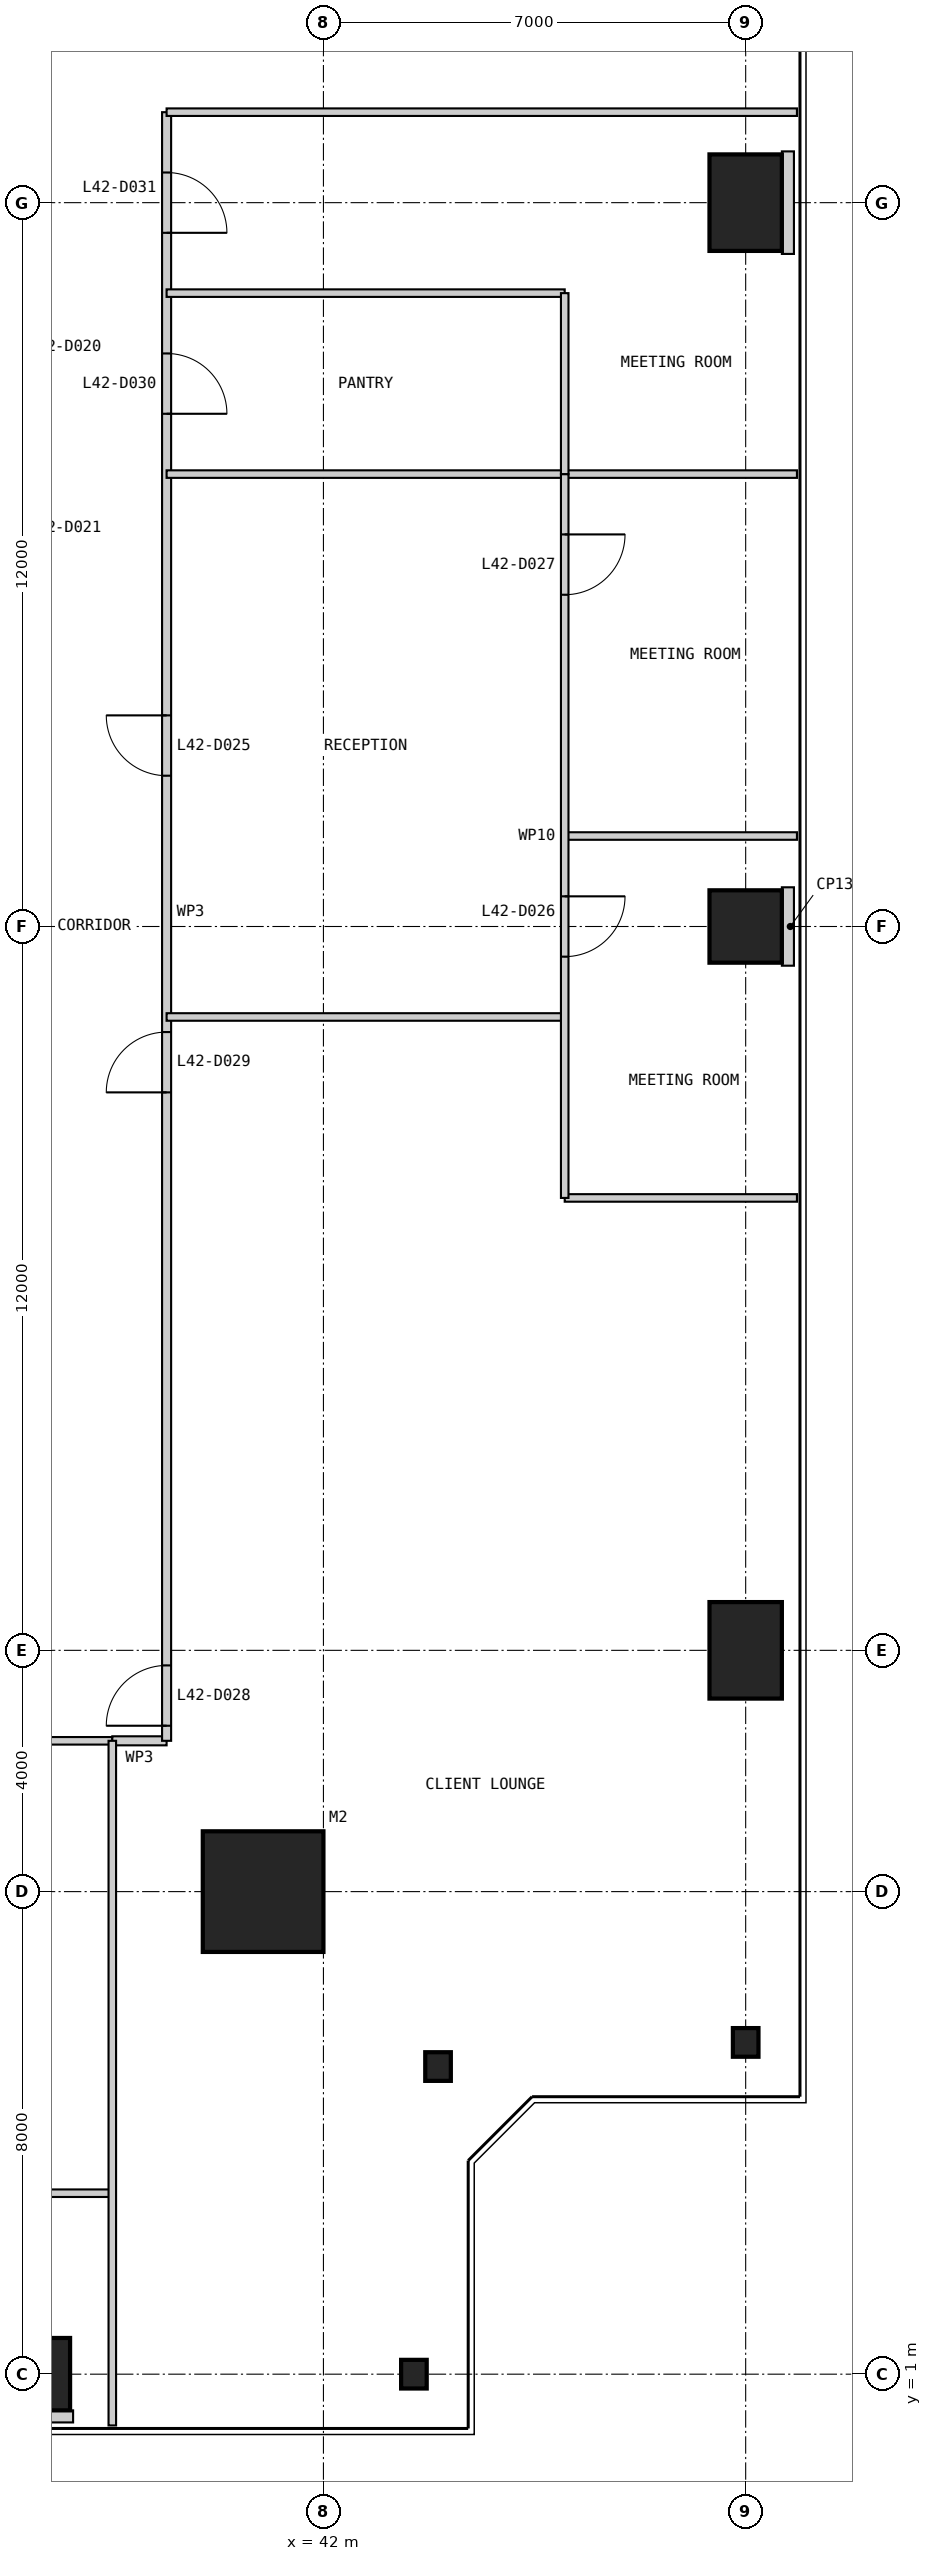
"""IFC4 building model, lengths in metres.
Left out: names, types, materials, properties, quantities, classifications, styles, units other than length and angle.
Written with IfcOpenShell. Run it as: python <this file> out.ifc"""

import sys

from ifc_helpers import new_model, si_unit, direction, frame, frame_2d, origin, origin_2d, place, context, subcontext, project, spatial, rectangle, i_section, extrude, element, fill, save


model = new_model("IFC4")
c1 = context("Model", 3, precision=1e-05, world=origin(), true_north=direction((0.0, 1.0)))
c2 = subcontext(c1, "Body", "Model", "MODEL_VIEW")
j1 = project(units=[si_unit("LENGTHUNIT", "METRE"), si_unit("PLANEANGLEUNIT", "RADIAN")], contexts=[c1])
p1 = place(None, origin())
s1 = spatial("IfcSite", under=j1, at=p1, CompositionType="ELEMENT")
p2 = place(p1, origin())
s2 = spatial("IfcBuilding", under=s1, at=p2, CompositionType="ELEMENT")
p3 = place(p2, frame((0.0, 0.0, 181.8)))
s3 = spatial("IfcBuildingStorey", under=s2, at=p3, CompositionType="ELEMENT", Elevation=181.8)
p4 = place(p3, frame((41.0, 9.0, 0.0), z_axis=(0.0, 0.0, 1.0), x_axis=(1.0, 0.0, 0.0)))
e1 = element("IfcColumn", 1, at=p4, inside=s3, PredefinedType="COLUMN", context=c2, shape_type="SweptSolid", body=[
    extrude(rectangle(XDim=2.0, YDim=2.0, at=origin_2d()), origin(), (0.0, 0.0, 1.0), 4.0),
])
p5 = place(p3, frame((37.0, 1.0, 0.0), z_axis=(0.0, 0.0, 1.0), x_axis=(1.0, 0.0, 0.0)))
e2 = element("IfcColumn", 2, at=p5, inside=s3, PredefinedType="COLUMN", context=c2, shape_type="SweptSolid", body=[
    extrude(rectangle(XDim=1.6, YDim=1.2, at=origin_2d()), origin(), (0.0, 0.0, 1.0), 4.0),
])
for number, where, z_axis, x_axis in (
    (3, (43.5, 1.0, 0.0), (0.0, 0.0, 1.0), (1.0, 0.0, 0.0)),
    (4, (43.9, 6.1, 0.0), (0.0, 0.0, 1.0), (1.0, 0.0, 0.0)),
    (5, (49.0, 6.5, 0.0), (0.0, 0.0, 1.0), (1.0, 0.0, 0.0)),
):
    element("IfcColumn", number, at=place(p3, frame(where, z_axis=z_axis, x_axis=x_axis)), inside=s3, PredefinedType="COLUMN", context=c2, shape_type="SweptSolid", body=[
        extrude(i_section(OverallWidth=0.424, OverallDepth=0.475, WebThickness=0.048, FlangeThickness=0.077, at=origin_2d()), origin(), (0.0, 0.0, 1.0), 4.0),
    ])
p6 = place(p3, frame((49.0, 13.0, 0.0), z_axis=(0.0, 0.0, 1.0), x_axis=(1.0, 0.0, 0.0)))
e6 = element("IfcColumn", 6, at=p6, inside=s3, PredefinedType="COLUMN", context=c2, shape_type="SweptSolid", body=[
    extrude(rectangle(XDim=1.2, YDim=1.6, at=origin_2d()), origin(), (0.0, 0.0, 1.0), 4.0),
])
p7 = place(p3, frame((49.0, 25.0, 0.0), z_axis=(0.0, 0.0, 1.0), x_axis=(1.0, 0.0, 0.0)))
e7 = element("IfcColumn", 7, at=p7, inside=s3, PredefinedType="COLUMN", context=c2, shape_type="SweptSolid", body=[
    extrude(rectangle(XDim=1.2, YDim=1.2, at=origin_2d()), origin(), (0.0, 0.0, 1.0), 4.0),
])
p8 = place(p3, frame((49.0, 37.0, 0.0), z_axis=(0.0, 0.0, 1.0), x_axis=(1.0, 0.0, 0.0)))
e8 = element("IfcColumn", 8, at=p8, inside=s3, PredefinedType="COLUMN", context=c2, shape_type="SweptSolid", body=[
    extrude(rectangle(XDim=1.2, YDim=1.6, at=origin_2d()), origin(), (0.0, 0.0, 1.0), 4.0),
])
p9 = place(p3, frame((32.5, 4.0, 0.0), z_axis=(0.0, 0.0, 1.0), x_axis=(1.0, 0.0, 0.0)))
e9 = element("IfcWall", 9, at=p9, inside=s3, PredefinedType="PARTITIONING", context=c2, shape_type="SweptSolid", body=[
    extrude(rectangle(XDim=6.0, YDim=0.125, at=frame_2d((3.0, 0.0))), origin(), (0.0, 0.0, 1.0), 3.85),
])
p10 = place(p3, frame((35.5, 11.5, 0.0), z_axis=(0.0, 0.0, 1.0), x_axis=(1.0, 0.0, 0.0)))
e10 = element("IfcWall", 10, at=p10, inside=s3, PredefinedType="PARTITIONING", context=c2, shape_type="SweptSolid", body=[
    extrude(rectangle(XDim=3.0, YDim=0.125, at=frame_2d((1.5, 0.0))), origin(), (0.0, 0.0, 1.0), 3.85),
])
p11 = place(p3, frame((38.5, 11.5, 0.0), z_axis=(0.0, 0.0, 1.0), x_axis=(1.0, 0.0, 0.0)))
e11 = element("IfcWall", 11, at=p11, inside=s3, PredefinedType="PARTITIONING", context=c2, shape_type="SweptSolid", body=[
    extrude(rectangle(XDim=0.9, YDim=0.15, at=frame_2d((0.45, 0.0))), origin(), (0.0, 0.0, 1.0), 3.85),
])
p12 = place(p3, frame((39.4, 11.5, 0.0), z_axis=(0.0, 0.0, 1.0), x_axis=(0.0, 1.0, 0.0)))
e12 = element("IfcWall", 12, at=p12, inside=s3, PredefinedType="PARTITIONING", context=c2, shape_type="SweptSolid", body=[
    extrude(rectangle(XDim=27.0, YDim=0.15, at=frame_2d((13.5, 0.0))), origin(), (0.0, 0.0, 1.0), 3.85),
])
p13 = place(p12, frame((16.0, 0.0, 0.0)))
e13 = element("IfcOpeningElement", 13, at=p13, cuts=e12, PredefinedType="OPENING", context=c2, shape_type="SweptSolid", body=[
    extrude(rectangle(XDim=1.0, YDim=2.2, at=frame_2d((0.5, 1.1))), frame((0.0, 0.085, 0.0), z_axis=(0.0, -1.0, 0.0), x_axis=(1.0, 0.0, 0.0)), (0.0, 0.0, 1.0), 0.17),
])
p14 = place(p12, frame((0.25, 0.0, 0.0)))
e14 = element("IfcOpeningElement", 14, at=p14, cuts=e12, PredefinedType="OPENING", context=c2, shape_type="SweptSolid", body=[
    extrude(rectangle(XDim=1.0, YDim=2.2, at=frame_2d((0.5, 1.1))), frame((0.0, 0.085, 0.0), z_axis=(0.0, -1.0, 0.0), x_axis=(1.0, 0.0, 0.0)), (0.0, 0.0, 1.0), 0.17),
])
p15 = place(p12, frame((10.75, 0.0, 0.0)))
e15 = element("IfcOpeningElement", 15, at=p15, cuts=e12, PredefinedType="OPENING", context=c2, shape_type="SweptSolid", body=[
    extrude(rectangle(XDim=1.0, YDim=2.2, at=frame_2d((0.5, 1.1))), frame((0.0, 0.085, 0.0), z_axis=(0.0, -1.0, 0.0), x_axis=(1.0, 0.0, 0.0)), (0.0, 0.0, 1.0), 0.17),
])
p16 = place(p12, frame((22.0, 0.0, 0.0)))
e16 = element("IfcOpeningElement", 16, at=p16, cuts=e12, PredefinedType="OPENING", context=c2, shape_type="SweptSolid", body=[
    extrude(rectangle(XDim=1.0, YDim=2.2, at=frame_2d((0.5, 1.1))), frame((0.0, 0.085, 0.0), z_axis=(0.0, -1.0, 0.0), x_axis=(1.0, 0.0, 0.0)), (0.0, 0.0, 1.0), 0.17),
])
p17 = place(p12, frame((25.0, 0.0, 0.0)))
e17 = element("IfcOpeningElement", 17, at=p17, cuts=e12, PredefinedType="OPENING", context=c2, shape_type="SweptSolid", body=[
    extrude(rectangle(XDim=1.0, YDim=2.2, at=frame_2d((0.5, 1.1))), frame((0.0, 0.085, 0.0), z_axis=(0.0, -1.0, 0.0), x_axis=(1.0, 0.0, 0.0)), (0.0, 0.0, 1.0), 0.17),
])
p18 = place(p3, frame((38.5, 0.15, 0.0), z_axis=(0.0, 0.0, 1.0), x_axis=(0.0, 1.0, 0.0)))
e18 = element("IfcWall", 18, at=p18, inside=s3, PredefinedType="PARTITIONING", context=c2, shape_type="SweptSolid", body=[
    extrude(rectangle(XDim=11.35, YDim=0.125, at=frame_2d((5.675, 0.0))), origin(), (0.0, 0.0, 1.0), 3.85),
])
p19 = place(p3, frame((49.85, 20.5, 0.0), z_axis=(0.0, 0.0, 1.0), x_axis=(-1.0, 0.0, 0.0)))
e19 = element("IfcWall", 19, at=p19, inside=s3, PredefinedType="PARTITIONING", context=c2, shape_type="SweptSolid", body=[
    extrude(rectangle(XDim=3.85, YDim=0.125, at=frame_2d((1.925, 0.0))), origin(), (0.0, 0.0, 1.0), 3.85),
])
p20 = place(p3, frame((46.0, 23.5, 0.0), z_axis=(0.0, 0.0, 1.0), x_axis=(-1.0, 0.0, 0.0)))
e20 = element("IfcWall", 20, at=p20, inside=s3, PredefinedType="PARTITIONING", context=c2, shape_type="SweptSolid", body=[
    extrude(rectangle(XDim=6.6, YDim=0.125, at=frame_2d((3.3, 0.0))), origin(), (0.0, 0.0, 1.0), 3.85),
])
p21 = place(p3, frame((49.85, 26.5, 0.0), z_axis=(0.0, 0.0, 1.0), x_axis=(-1.0, 0.0, 0.0)))
e21 = element("IfcWall", 21, at=p21, inside=s3, PredefinedType="PARTITIONING", context=c2, shape_type="SweptSolid", body=[
    extrude(rectangle(XDim=3.85, YDim=0.125, at=frame_2d((1.925, 0.0))), origin(), (0.0, 0.0, 1.0), 3.85),
])
p22 = place(p3, frame((49.85, 32.5, 0.0), z_axis=(0.0, 0.0, 1.0), x_axis=(-1.0, 0.0, 0.0)))
e22 = element("IfcWall", 22, at=p22, inside=s3, PredefinedType="PARTITIONING", context=c2, shape_type="SweptSolid", body=[
    extrude(rectangle(XDim=10.45, YDim=0.125, at=frame_2d((5.225, 0.0))), origin(), (0.0, 0.0, 1.0), 3.85),
])
p23 = place(p3, frame((46.0, 35.5, 0.0), z_axis=(0.0, 0.0, 1.0), x_axis=(-1.0, 0.0, 0.0)))
e23 = element("IfcWall", 23, at=p23, inside=s3, PredefinedType="PARTITIONING", context=c2, shape_type="SweptSolid", body=[
    extrude(rectangle(XDim=6.6, YDim=0.125, at=frame_2d((3.3, 0.0))), origin(), (0.0, 0.0, 1.0), 3.85),
])
p24 = place(p3, frame((46.0, 20.5, 0.0), z_axis=(0.0, 0.0, 1.0), x_axis=(0.0, 1.0, 0.0)))
e24 = element("IfcWall", 24, at=p24, inside=s3, PredefinedType="PARTITIONING", context=c2, shape_type="SweptSolid", body=[
    extrude(rectangle(XDim=12.0, YDim=0.125, at=frame_2d((6.0, 0.0))), origin(), (0.0, 0.0, 1.0), 3.238),
])
p25 = place(p24, frame((4.0, 0.0, 0.0)))
e25 = element("IfcOpeningElement", 25, at=p25, cuts=e24, PredefinedType="OPENING", context=c2, shape_type="SweptSolid", body=[
    extrude(rectangle(XDim=1.0, YDim=2.2, at=frame_2d((0.5, 1.1))), frame((0.0, 0.073, 0.0), z_axis=(0.0, -1.0, 0.0), x_axis=(1.0, 0.0, 0.0)), (0.0, 0.0, 1.0), 0.145),
])
p26 = place(p24, frame((10.0, 0.0, 0.0)))
e26 = element("IfcOpeningElement", 26, at=p26, cuts=e24, PredefinedType="OPENING", context=c2, shape_type="SweptSolid", body=[
    extrude(rectangle(XDim=1.0, YDim=2.2, at=frame_2d((0.5, 1.1))), frame((0.0, 0.073, 0.0), z_axis=(0.0, -1.0, 0.0), x_axis=(1.0, 0.0, 0.0)), (0.0, 0.0, 1.0), 0.145),
])
p27 = place(p3, frame((46.0, 32.5, 0.0), z_axis=(0.0, 0.0, 1.0), x_axis=(0.0, 1.0, 0.0)))
e27 = element("IfcWall", 27, at=p27, inside=s3, PredefinedType="PARTITIONING", context=c2, shape_type="SweptSolid", body=[
    extrude(rectangle(XDim=3.0, YDim=0.125, at=frame_2d((1.5, 0.0))), origin(), (0.0, 0.0, 1.0), 3.238),
])
p28 = place(p3, frame((49.85, 38.5, 0.0), z_axis=(0.0, 0.0, 1.0), x_axis=(-1.0, 0.0, 0.0)))
e28 = element("IfcWall", 28, at=p28, inside=s3, PredefinedType="PARTITIONING", context=c2, shape_type="SweptSolid", body=[
    extrude(rectangle(XDim=10.45, YDim=0.125, at=frame_2d((5.225, 0.0))), origin(), (0.0, 0.0, 1.0), 3.85),
])
p29 = place(p3, frame((37.0, 0.2, 0.0), z_axis=(0.0, 0.0, 1.0), x_axis=(0.0, 1.0, 0.0)))
e29 = element("IfcWall", 29, at=p29, inside=s3, PredefinedType="PARTITIONING", context=c2, shape_type="SweptSolid", body=[
    extrude(rectangle(XDim=0.2, YDim=1.7, at=frame_2d((0.1, 0.0))), origin(), (0.0, 0.0, 1.0), 3.85),
])
p30 = place(p3, frame((49.8, 25.0, 0.0), z_axis=(0.0, 0.0, 1.0), x_axis=(-1.0, 0.0, 0.0)))
e30 = element("IfcWall", 30, at=p30, inside=s3, PredefinedType="PARTITIONING", context=c2, shape_type="SweptSolid", body=[
    extrude(rectangle(XDim=0.2, YDim=1.3, at=frame_2d((0.1, 0.0))), origin(), (0.0, 0.0, 1.0), 3.85),
])
p31 = place(p3, frame((49.8, 37.0, 0.0), z_axis=(0.0, 0.0, 1.0), x_axis=(-1.0, 0.0, 0.0)))
e31 = element("IfcWall", 31, at=p31, inside=s3, PredefinedType="PARTITIONING", context=c2, shape_type="SweptSolid", body=[
    extrude(rectangle(XDim=0.2, YDim=1.7, at=frame_2d((0.1, 0.0))), origin(), (0.0, 0.0, 1.0), 3.85),
])
p32 = place(p13, origin())
e32 = element("IfcDoor", 32, at=p32, inside=s3, OperationType="SINGLE_SWING_RIGHT", PredefinedType="DOOR", context=c2, shape_type="SweptSolid", body=[
    extrude(rectangle(XDim=1.0, YDim=2.2, at=frame_2d((0.5, 1.1))), frame((0.0, 0.025, 0.0), z_axis=(0.0, -1.0, 0.0), x_axis=(1.0, 0.0, 0.0)), (0.0, 0.0, 1.0), 0.05),
])
fill(e13, e32)
p33 = place(p25, frame((1.0, 0.0, 0.0), z_axis=(0.0, 0.0, 1.0), x_axis=(-1.0, 0.0, 0.0)))
e33 = element("IfcDoor", 33, at=p33, inside=s3, OperationType="SINGLE_SWING_LEFT", PredefinedType="DOOR", context=c2, shape_type="SweptSolid", body=[
    extrude(rectangle(XDim=1.0, YDim=2.2, at=frame_2d((0.5, 1.1))), frame((0.0, 0.025, 0.0), z_axis=(0.0, -1.0, 0.0), x_axis=(1.0, 0.0, 0.0)), (0.0, 0.0, 1.0), 0.05),
])
fill(e25, e33)
p34 = place(p26, frame((1.0, 0.0, 0.0), z_axis=(0.0, 0.0, 1.0), x_axis=(-1.0, 0.0, 0.0)))
e34 = element("IfcDoor", 34, at=p34, inside=s3, OperationType="SINGLE_SWING_LEFT", PredefinedType="DOOR", context=c2, shape_type="SweptSolid", body=[
    extrude(rectangle(XDim=1.0, YDim=2.2, at=frame_2d((0.5, 1.1))), frame((0.0, 0.025, 0.0), z_axis=(0.0, -1.0, 0.0), x_axis=(1.0, 0.0, 0.0)), (0.0, 0.0, 1.0), 0.05),
])
fill(e26, e34)
p35 = place(p14, origin())
e35 = element("IfcDoor", 35, at=p35, inside=s3, OperationType="SINGLE_SWING_LEFT", PredefinedType="DOOR", context=c2, shape_type="SweptSolid", body=[
    extrude(rectangle(XDim=1.0, YDim=2.2, at=frame_2d((0.5, 1.1))), frame((0.0, 0.025, 0.0), z_axis=(0.0, -1.0, 0.0), x_axis=(1.0, 0.0, 0.0)), (0.0, 0.0, 1.0), 0.05),
])
fill(e14, e35)
p36 = place(p15, origin())
e36 = element("IfcDoor", 36, at=p36, inside=s3, OperationType="SINGLE_SWING_LEFT", PredefinedType="DOOR", context=c2, shape_type="SweptSolid", body=[
    extrude(rectangle(XDim=1.0, YDim=2.2, at=frame_2d((0.5, 1.1))), frame((0.0, 0.025, 0.0), z_axis=(0.0, -1.0, 0.0), x_axis=(1.0, 0.0, 0.0)), (0.0, 0.0, 1.0), 0.05),
])
fill(e15, e36)
p37 = place(p16, frame((1.0, 0.0, 0.0), z_axis=(0.0, 0.0, 1.0), x_axis=(-1.0, 0.0, 0.0)))
e37 = element("IfcDoor", 37, at=p37, inside=s3, OperationType="SINGLE_SWING_RIGHT", PredefinedType="DOOR", context=c2, shape_type="SweptSolid", body=[
    extrude(rectangle(XDim=1.0, YDim=2.2, at=frame_2d((0.5, 1.1))), frame((0.0, 0.025, 0.0), z_axis=(0.0, -1.0, 0.0), x_axis=(1.0, 0.0, 0.0)), (0.0, 0.0, 1.0), 0.05),
])
fill(e16, e37)
p38 = place(p17, frame((1.0, 0.0, 0.0), z_axis=(0.0, 0.0, 1.0), x_axis=(-1.0, 0.0, 0.0)))
e38 = element("IfcDoor", 38, at=p38, inside=s3, OperationType="SINGLE_SWING_RIGHT", PredefinedType="DOOR", context=c2, shape_type="SweptSolid", body=[
    extrude(rectangle(XDim=1.0, YDim=2.2, at=frame_2d((0.5, 1.1))), frame((0.0, 0.025, 0.0), z_axis=(0.0, -1.0, 0.0), x_axis=(1.0, 0.0, 0.0)), (0.0, 0.0, 1.0), 0.05),
])
fill(e17, e38)
save(model, sys.argv[1])
